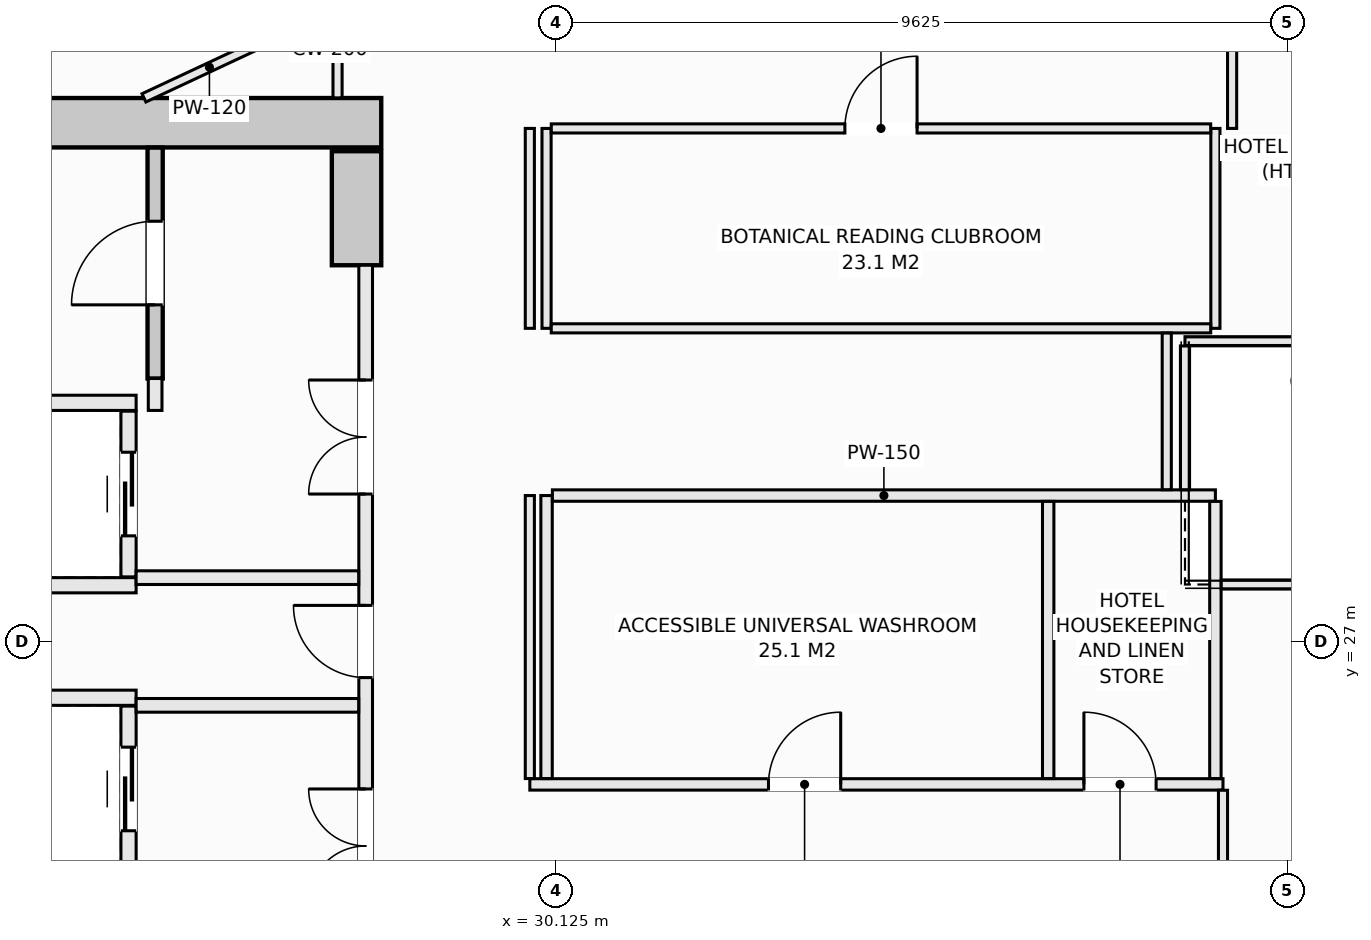
"""IFC4 building model, lengths in metres.
Left out: names, types, materials, properties, quantities, classifications, styles, units other than length and angle.
Written with IfcOpenShell. Run it as: python <this file> out.ifc"""

import sys

from ifc_helpers import new_model, si_unit, direction, frame, frame_2d, origin, place, context, subcontext, project, spatial, rectangle, extrude, element, fill, save


model = new_model("IFC4")
c1 = context("Model", 3, precision=1e-05, world=origin(), true_north=direction((0.0, 1.0)))
c2 = subcontext(c1, "Body", "Model", "MODEL_VIEW")
j1 = project(units=[si_unit("LENGTHUNIT", "METRE"), si_unit("PLANEANGLEUNIT", "RADIAN")], contexts=[c1])
p1 = place(None, origin())
s1 = spatial("IfcSite", under=j1, at=p1, CompositionType="ELEMENT")
p2 = place(p1, origin())
s2 = spatial("IfcBuilding", under=s1, at=p2, CompositionType="ELEMENT")
p3 = place(p2, frame((0.0, 0.0, 118.9)))
s3 = spatial("IfcBuildingStorey", under=s2, at=p3, CompositionType="ELEMENT", Elevation=118.9)
p4 = place(p3, frame((14.175, 33.825, -0.27), z_axis=(0.0, 0.0, 1.0), x_axis=(1.0, 0.0, 0.0)))
e1 = element("IfcWall", 1, at=p4, inside=s3, PredefinedType="SHEAR", context=c2, shape_type="SweptSolid", body=[
    extrude(rectangle(XDim=13.65, YDim=0.65, at=frame_2d((6.825, 0.0))), origin(), (0.0, 0.0, 1.0), 3.4),
])
p5 = place(p3, frame((27.5, 31.95, -0.27), z_axis=(0.0, 0.0, 1.0), x_axis=(0.0, 1.0, 0.0)))
e2 = element("IfcWall", 2, at=p5, inside=s3, PredefinedType="SHEAR", context=c2, shape_type="SweptSolid", body=[
    extrude(rectangle(XDim=1.5, YDim=0.65, at=frame_2d((0.75, 0.0))), origin(), (0.0, 0.0, 1.0), 3.4),
])
p6 = place(p3, frame((24.85, 30.46, -0.27), z_axis=(0.0, 0.0, 1.0), x_axis=(0.0, 1.0, 0.0)))
e3 = element("IfcWall", 3, at=p6, inside=s3, PredefinedType="SHEAR", context=c2, shape_type="SweptSolid", body=[
    extrude(rectangle(XDim=3.038, YDim=0.2, at=frame_2d((1.519, 0.0))), origin(), (0.0, 0.0, 1.0), 3.4),
])
p7 = place(p6, frame((0.969, 0.0, 0.27)))
e4 = element("IfcOpeningElement", 4, at=p7, cuts=e3, PredefinedType="OPENING", context=c2, shape_type="SweptSolid", body=[
    extrude(rectangle(XDim=1.1, YDim=2.15, at=frame_2d((0.55, 1.075))), frame((0.0, 0.11, 0.0), z_axis=(0.0, -1.0, 0.0), x_axis=(1.0, 0.0, 0.0)), (0.0, 0.0, 1.0), 0.22),
])
for number, where, z_axis, x_axis in (
    (5, (22.15, 30.14, 0.0), (0.0, 0.0, 1.0), (1.0, 0.0, 0.0)),
    (6, (22.15, 27.74, 0.0), (0.0, 0.0, 1.0), (1.0, 0.0, 0.0)),
):
    element("IfcWall", number, at=place(p3, frame(where, z_axis=z_axis, x_axis=x_axis)), inside=s3, PredefinedType="SOLIDWALL", context=c2, shape_type="SweptSolid", body=[
        extrude(rectangle(XDim=2.45, YDim=0.2, at=frame_2d((1.225, 0.0))), origin(), (0.0, 0.0, 1.0), 3.13),
    ])
p8 = place(p3, frame((24.5, 27.85, 0.0), z_axis=(0.0, 0.0, 1.0), x_axis=(0.0, 1.0, 0.0)))
e7 = element("IfcWall", 7, at=p8, inside=s3, PredefinedType="SOLIDWALL", context=c2, shape_type="SweptSolid", body=[
    extrude(rectangle(XDim=2.18, YDim=0.2, at=frame_2d((1.09, 0.0))), origin(), (0.0, 0.0, 1.0), 3.13),
])
p9 = place(p8, frame((0.54, 0.0, 0.0)))
e8 = element("IfcOpeningElement", 8, at=p9, cuts=e7, PredefinedType="OPENING", context=c2, shape_type="SweptSolid", body=[
    extrude(rectangle(XDim=1.1, YDim=2.2, at=frame_2d((0.55, 1.1))), frame((0.0, 0.11, 0.0), z_axis=(0.0, -1.0, 0.0), x_axis=(1.0, 0.0, 0.0)), (0.0, 0.0, 1.0), 0.22),
])
p10 = place(p3, frame((22.15, 26.26, 0.0), z_axis=(0.0, 0.0, 1.0), x_axis=(1.0, 0.0, 0.0)))
e9 = element("IfcWall", 9, at=p10, inside=s3, PredefinedType="SOLIDWALL", context=c2, shape_type="SweptSolid", body=[
    extrude(rectangle(XDim=2.45, YDim=0.2, at=frame_2d((1.225, 0.0))), origin(), (0.0, 0.0, 1.0), 3.13),
])
p11 = place(p3, frame((24.5, 23.97, 0.0), z_axis=(0.0, 0.0, 1.0), x_axis=(0.0, 1.0, 0.0)))
e10 = element("IfcWall", 10, at=p11, inside=s3, PredefinedType="SOLIDWALL", context=c2, shape_type="SweptSolid", body=[
    extrude(rectangle(XDim=2.18, YDim=0.2, at=frame_2d((1.09, 0.0))), origin(), (0.0, 0.0, 1.0), 3.13),
])
p12 = place(p11, frame((0.54, 0.0, 0.0)))
e11 = element("IfcOpeningElement", 11, at=p12, cuts=e10, PredefinedType="OPENING", context=c2, shape_type="SweptSolid", body=[
    extrude(rectangle(XDim=1.1, YDim=2.2, at=frame_2d((0.55, 1.1))), frame((0.0, 0.11, 0.0), z_axis=(0.0, -1.0, 0.0), x_axis=(1.0, 0.0, 0.0)), (0.0, 0.0, 1.0), 0.22),
])
p13 = place(p3, frame((24.85, 30.04, 0.0), z_axis=(0.0, 0.0, 1.0), x_axis=(0.0, 1.0, 0.0)))
e12 = element("IfcWall", 12, at=p13, inside=s3, PredefinedType="SOLIDWALL", context=c2, shape_type="SweptSolid", body=[
    extrude(rectangle(XDim=0.42, YDim=0.18, at=frame_2d((0.21, 0.0))), origin(), (0.0, 0.0, 1.0), 3.13),
])
p14 = place(p3, frame((27.62, 22.05, 0.0), z_axis=(0.0, 0.0, 1.0), x_axis=(0.0, 1.0, 0.0)))
e13 = element("IfcWall", 13, at=p14, inside=s3, PredefinedType="SOLIDWALL", context=c2, shape_type="SweptSolid", body=[
    extrude(rectangle(XDim=9.9, YDim=0.18, at=frame_2d((4.95, 0.0))), origin(), (0.0, 0.0, 1.0), 3.13),
])
p15 = place(p14, frame((4.475, 0.0, 0.0)))
e14 = element("IfcOpeningElement", 14, at=p15, cuts=e13, PredefinedType="OPENING", context=c2, shape_type="SweptSolid", body=[
    extrude(rectangle(XDim=0.95, YDim=2.1, at=frame_2d((0.475, 1.05))), frame((0.0, 0.1, 0.0), z_axis=(0.0, -1.0, 0.0), x_axis=(1.0, 0.0, 0.0)), (0.0, 0.0, 1.0), 0.2),
])
p16 = place(p14, frame((6.89, 0.0, 0.0)))
e15 = element("IfcOpeningElement", 15, at=p16, cuts=e13, PredefinedType="OPENING", context=c2, shape_type="SweptSolid", body=[
    extrude(rectangle(XDim=1.5, YDim=2.2, at=frame_2d((0.75, 1.1))), frame((0.0, 0.1, 0.0), z_axis=(0.0, -1.0, 0.0), x_axis=(1.0, 0.0, 0.0)), (0.0, 0.0, 1.0), 0.2),
])
p17 = place(p14, frame((1.51, 0.0, 0.0)))
e16 = element("IfcOpeningElement", 16, at=p17, cuts=e13, PredefinedType="OPENING", context=c2, shape_type="SweptSolid", body=[
    extrude(rectangle(XDim=1.5, YDim=2.2, at=frame_2d((0.75, 1.1))), frame((0.0, 0.1, 0.0), z_axis=(0.0, -1.0, 0.0), x_axis=(1.0, 0.0, 0.0)), (0.0, 0.0, 1.0), 0.2),
])
for number, where, z_axis, x_axis in (
    (17, (24.6, 27.84, 0.0), (0.0, 0.0, 1.0), (1.0, 0.0, 0.0)),
    (18, (24.6, 26.16, 0.0), (0.0, 0.0, 1.0), (1.0, 0.0, 0.0)),
):
    element("IfcWall", number, at=place(p3, frame(where, z_axis=z_axis, x_axis=x_axis)), inside=s3, PredefinedType="SOLIDWALL", context=c2, shape_type="SweptSolid", body=[
        extrude(rectangle(XDim=2.928, YDim=0.18, at=frame_2d((1.464, 0.0))), origin(), (0.0, 0.0, 1.0), 3.13),
    ])
p18 = place(p3, frame((29.78, 25.12, 0.0), z_axis=(0.0, 0.0, 1.0), x_axis=(1.0, 0.0, 0.0)))
e19 = element("IfcWall", 19, at=p18, inside=s3, PredefinedType="PARTITIONING", context=c2, shape_type="SweptSolid", body=[
    extrude(rectangle(XDim=9.12, YDim=0.15, at=frame_2d((4.56, 0.0))), origin(), (0.0, 0.0, 1.0), 3.13),
])
p19 = place(p18, frame((3.14, 0.0, 0.0)))
e20 = element("IfcOpeningElement", 20, at=p19, cuts=e19, PredefinedType="OPENING", context=c2, shape_type="SweptSolid", body=[
    extrude(rectangle(XDim=0.95, YDim=2.1, at=frame_2d((0.475, 1.05))), frame((0.0, 0.085, 0.0), z_axis=(0.0, -1.0, 0.0), x_axis=(1.0, 0.0, 0.0)), (0.0, 0.0, 1.0), 0.17),
])
p20 = place(p18, frame((7.29, 0.0, 0.0)))
e21 = element("IfcOpeningElement", 21, at=p20, cuts=e19, PredefinedType="OPENING", context=c2, shape_type="SweptSolid", body=[
    extrude(rectangle(XDim=0.95, YDim=2.1, at=frame_2d((0.475, 1.05))), frame((0.0, 0.085, 0.0), z_axis=(0.0, -1.0, 0.0), x_axis=(1.0, 0.0, 0.0)), (0.0, 0.0, 1.0), 0.17),
])
p21 = place(p3, frame((30.0, 25.197, 0.0), z_axis=(0.0, 0.0, 1.0), x_axis=(0.0, 1.0, 0.0)))
e22 = element("IfcWall", 22, at=p21, inside=s3, PredefinedType="PARTITIONING", context=c2, shape_type="SweptSolid", body=[
    extrude(rectangle(XDim=3.723, YDim=0.15, at=frame_2d((1.861, 0.0))), origin(), (0.0, 0.0, 1.0), 3.13),
])
p22 = place(p3, frame((30.0, 31.12, 0.0), z_axis=(0.0, 0.0, 1.0), x_axis=(0.0, 1.0, 0.0)))
e23 = element("IfcWall", 23, at=p22, inside=s3, PredefinedType="PARTITIONING", context=c2, shape_type="SweptSolid", body=[
    extrude(rectangle(XDim=2.63, YDim=0.12, at=frame_2d((1.315, 0.0))), origin(), (0.0, 0.0, 1.0), 3.13),
])
p23 = place(p3, frame((30.077, 28.92, 0.0), z_axis=(0.0, 0.0, 1.0), x_axis=(1.0, 0.0, 0.0)))
e24 = element("IfcWall", 24, at=p23, inside=s3, PredefinedType="PARTITIONING", context=c2, shape_type="SweptSolid", body=[
    extrude(rectangle(XDim=8.723, YDim=0.15, at=frame_2d((4.362, 0.0))), origin(), (0.0, 0.0, 1.0), 3.13),
])
for number, where, z_axis, x_axis in (
    (25, (36.6, 25.197, 0.0), (0.0, 0.0, 1.0), (0.0, 1.0, 0.0)),
    (26, (38.8, 25.197, 0.0), (0.0, 0.0, 1.0), (0.0, 1.0, 0.0)),
):
    element("IfcWall", number, at=place(p3, frame(where, z_axis=z_axis, x_axis=x_axis)), inside=s3, PredefinedType="PARTITIONING", context=c2, shape_type="SweptSolid", body=[
        extrude(rectangle(XDim=3.646, YDim=0.15, at=frame_2d((1.823, 0.0))), origin(), (0.0, 0.0, 1.0), 3.13),
    ])
p24 = place(p3, frame((38.8, 31.12, 0.0), z_axis=(0.0, 0.0, 1.0), x_axis=(0.0, 1.0, 0.0)))
e27 = element("IfcWall", 27, at=p24, inside=s3, PredefinedType="PARTITIONING", context=c2, shape_type="SweptSolid", body=[
    extrude(rectangle(XDim=2.63, YDim=0.12, at=frame_2d((1.315, 0.0))), origin(), (0.0, 0.0, 1.0), 3.13),
])
p25 = place(p3, frame((30.062, 31.12, 0.0), z_axis=(0.0, 0.0, 1.0), x_axis=(1.0, 0.0, 0.0)))
e28 = element("IfcWall", 28, at=p25, inside=s3, PredefinedType="PARTITIONING", context=c2, shape_type="SweptSolid", body=[
    extrude(rectangle(XDim=8.676, YDim=0.12, at=frame_2d((4.338, 0.0))), origin(), (0.0, 0.0, 1.0), 3.13),
])
p26 = place(p3, frame((30.062, 33.75, 0.0), z_axis=(0.0, 0.0, 1.0), x_axis=(1.0, 0.0, 0.0)))
e29 = element("IfcWall", 29, at=p26, inside=s3, PredefinedType="PARTITIONING", context=c2, shape_type="SweptSolid", body=[
    extrude(rectangle(XDim=8.676, YDim=0.12, at=frame_2d((4.338, 0.0))), origin(), (0.0, 0.0, 1.0), 3.13),
])
p27 = place(p26, frame((3.863, 0.0, 0.0)))
e30 = element("IfcOpeningElement", 30, at=p27, cuts=e29, PredefinedType="OPENING", context=c2, shape_type="SweptSolid", body=[
    extrude(rectangle(XDim=0.95, YDim=2.1, at=frame_2d((0.475, 1.05))), frame((0.0, 0.07, 0.0), z_axis=(0.0, -1.0, 0.0), x_axis=(1.0, 0.0, 0.0)), (0.0, 0.0, 1.0), 0.14),
])
p28 = place(p3, frame((39.02, 33.75, 0.0), z_axis=(0.0, 0.0, 1.0), x_axis=(0.0, 1.0, 0.0)))
e31 = element("IfcWall", 31, at=p28, inside=s3, PredefinedType="PARTITIONING", context=c2, shape_type="SweptSolid", body=[
    extrude(rectangle(XDim=2.0, YDim=0.12, at=frame_2d((1.0, 0.0))), origin(), (0.0, 0.0, 1.0), 3.13),
])
p29 = place(p3, frame((27.25, 34.152, 0.0), z_axis=(0.0, 0.0, 1.0), x_axis=(0.0, 1.0, 0.0)))
e32 = element("IfcWall", 32, at=p29, inside=s3, PredefinedType="PARTITIONING", context=c2, shape_type="SweptSolid", body=[
    extrude(rectangle(XDim=0.806, YDim=0.12, at=frame_2d((0.403, 0.0))), origin(), (0.0, 0.0, 1.0), 3.13),
])
p30 = place(p3, frame((29.78, 25.197, 0.0), z_axis=(0.0, 0.0, 1.0), x_axis=(0.0, 1.0, 0.0)))
e33 = element("IfcWall", 33, at=p30, inside=s3, PredefinedType="PARTITIONING", context=c2, shape_type="SweptSolid", body=[
    extrude(rectangle(XDim=3.723, YDim=0.12, at=frame_2d((1.861, 0.0))), origin(), (0.0, 0.0, 1.0), 3.13),
])
p31 = place(p3, frame((29.78, 31.12, 0.0), z_axis=(0.0, 0.0, 1.0), x_axis=(0.0, 1.0, 0.0)))
e34 = element("IfcWall", 34, at=p31, inside=s3, PredefinedType="PARTITIONING", context=c2, shape_type="SweptSolid", body=[
    extrude(rectangle(XDim=2.63, YDim=0.12, at=frame_2d((1.315, 0.0))), origin(), (0.0, 0.0, 1.0), 3.13),
])
p32 = place(p3, frame((38.16, 28.997, 0.0), z_axis=(0.0, 0.0, 1.0), x_axis=(0.0, 1.0, 0.0)))
e35 = element("IfcWall", 35, at=p32, inside=s3, PredefinedType="PARTITIONING", context=c2, shape_type="SweptSolid", body=[
    extrude(rectangle(XDim=2.061, YDim=0.12, at=frame_2d((1.031, 0.0))), origin(), (0.0, 0.0, 1.0), 3.13),
])
p33 = place(p3, frame((38.9, 23.02, 0.0), z_axis=(0.0, 0.0, 1.0), x_axis=(0.0, 1.0, 0.0)))
e36 = element("IfcWall", 36, at=p33, inside=s3, PredefinedType="PARTITIONING", context=c2, shape_type="SweptSolid", body=[
    extrude(rectangle(XDim=2.023, YDim=0.12, at=frame_2d((1.011, 0.0))), origin(), (0.0, 0.0, 1.0), 3.13),
])
p34 = place(p3, frame((24.703, 34.152, 0.0), z_axis=(0.0, 0.0, 1.0), x_axis=(0.90580239241, 0.423700396393, 0.0)))
e37 = element("IfcWall", 37, at=p34, inside=s3, PredefinedType="PARTITIONING", context=c2, shape_type="SweptSolid", body=[
    extrude(rectangle(XDim=1.902, YDim=0.12, at=frame_2d((0.951, 0.0))), origin(), (0.0, 0.0, 1.0), 3.13),
])
p35 = place(p3, frame((38.877, 27.75, 0.0), z_axis=(0.0, 0.0, 1.0), x_axis=(1.0, 0.0, 0.0)))
e38 = element("IfcWall", 38, at=p35, inside=s3, PredefinedType="PARTITIONING", context=c2, shape_type="SweptSolid", body=[
    extrude(rectangle(XDim=4.923, YDim=0.12, at=frame_2d((2.461, 0.0))), origin(), (0.0, 0.0, 1.0), 3.13),
])
p36 = place(p3, frame((36.468, 40.488, 0.0), z_axis=(0.0, 0.0, 1.0), x_axis=(0.607033615812, -0.794676153709, 0.0)))
e39 = element("IfcWall", 39, at=p36, inside=s3, PredefinedType="PARTITIONING", context=c2, shape_type="SweptSolid", body=[
    extrude(rectangle(XDim=12.078, YDim=0.15, at=frame_2d((6.039, 0.0))), origin(), (0.0, 0.0, 1.0), 3.13),
])
p37 = place(p3, frame((38.4, 30.95, 0.0), z_axis=(0.0, 0.0, 1.0), x_axis=(1.0, 0.0, 0.0)))
e40 = element("IfcWall", 40, at=p37, inside=s3, PredefinedType="PARTITIONING", context=c2, shape_type="SweptSolid", body=[
    extrude(rectangle(XDim=5.257, YDim=0.12, at=frame_2d((2.629, 0.0))), origin(), (0.0, 0.0, 1.0), 3.13),
])
p38 = place(p3, frame((38.4, 28.997, 0.0), z_axis=(0.0, 0.0, 1.0), x_axis=(0.0, 1.0, 0.0)))
e41 = element("IfcWall", 41, at=p38, inside=s3, PredefinedType="PARTITIONING", context=c2, shape_type="SweptSolid", body=[
    extrude(rectangle(XDim=1.891, YDim=0.12, at=frame_2d((0.945, 0.0))), origin(), (0.0, 0.0, 1.0), 3.13),
])
p39 = place(p7, origin())
e42 = element("IfcDoor", 42, at=p39, inside=s3, OperationType="SINGLE_SWING_LEFT", PredefinedType="DOOR", context=c2, shape_type="SweptSolid", body=[
    extrude(rectangle(XDim=1.1, YDim=2.15, at=frame_2d((0.55, 1.075))), frame((0.0, 0.025, 0.0), z_axis=(0.0, -1.0, 0.0), x_axis=(1.0, 0.0, 0.0)), (0.0, 0.0, 1.0), 0.05),
])
fill(e4, e42)
p40 = place(p9, origin())
e43 = element("IfcDoor", 43, at=p40, inside=s3, OperationType="SLIDING_TO_LEFT", PredefinedType="DOOR", context=c2, shape_type="SweptSolid", body=[
    extrude(rectangle(XDim=1.1, YDim=2.2, at=frame_2d((0.55, 1.1))), frame((0.0, 0.025, 0.0), z_axis=(0.0, -1.0, 0.0), x_axis=(1.0, 0.0, 0.0)), (0.0, 0.0, 1.0), 0.05),
])
fill(e8, e43)
p41 = place(p12, origin())
e44 = element("IfcDoor", 44, at=p41, inside=s3, OperationType="SLIDING_TO_LEFT", PredefinedType="DOOR", context=c2, shape_type="SweptSolid", body=[
    extrude(rectangle(XDim=1.1, YDim=2.2, at=frame_2d((0.55, 1.1))), frame((0.0, 0.025, 0.0), z_axis=(0.0, -1.0, 0.0), x_axis=(1.0, 0.0, 0.0)), (0.0, 0.0, 1.0), 0.05),
])
fill(e11, e44)
p42 = place(p15, origin())
e45 = element("IfcDoor", 45, at=p42, inside=s3, OperationType="SINGLE_SWING_RIGHT", PredefinedType="DOOR", context=c2, shape_type="SweptSolid", body=[
    extrude(rectangle(XDim=0.95, YDim=2.1, at=frame_2d((0.475, 1.05))), frame((0.0, 0.025, 0.0), z_axis=(0.0, -1.0, 0.0), x_axis=(1.0, 0.0, 0.0)), (0.0, 0.0, 1.0), 0.05),
])
fill(e14, e45)
p43 = place(p16, origin())
e46 = element("IfcDoor", 46, at=p43, inside=s3, OperationType="DOUBLE_DOOR_SINGLE_SWING", PredefinedType="DOOR", context=c2, shape_type="SweptSolid", body=[
    extrude(rectangle(XDim=1.5, YDim=2.2, at=frame_2d((0.75, 1.1))), frame((0.0, 0.025, 0.0), z_axis=(0.0, -1.0, 0.0), x_axis=(1.0, 0.0, 0.0)), (0.0, 0.0, 1.0), 0.05),
])
fill(e15, e46)
p44 = place(p17, origin())
e47 = element("IfcDoor", 47, at=p44, inside=s3, OperationType="DOUBLE_DOOR_SINGLE_SWING", PredefinedType="DOOR", context=c2, shape_type="SweptSolid", body=[
    extrude(rectangle(XDim=1.5, YDim=2.2, at=frame_2d((0.75, 1.1))), frame((0.0, 0.025, 0.0), z_axis=(0.0, -1.0, 0.0), x_axis=(1.0, 0.0, 0.0)), (0.0, 0.0, 1.0), 0.05),
])
fill(e16, e47)
p45 = place(p19, origin())
e48 = element("IfcDoor", 48, at=p45, inside=s3, OperationType="SINGLE_SWING_RIGHT", PredefinedType="DOOR", context=c2, shape_type="SweptSolid", body=[
    extrude(rectangle(XDim=0.95, YDim=2.1, at=frame_2d((0.475, 1.05))), frame((0.0, 0.025, 0.0), z_axis=(0.0, -1.0, 0.0), x_axis=(1.0, 0.0, 0.0)), (0.0, 0.0, 1.0), 0.05),
])
fill(e20, e48)
p46 = place(p20, origin())
e49 = element("IfcDoor", 49, at=p46, inside=s3, OperationType="SINGLE_SWING_LEFT", PredefinedType="DOOR", context=c2, shape_type="SweptSolid", body=[
    extrude(rectangle(XDim=0.95, YDim=2.1, at=frame_2d((0.475, 1.05))), frame((0.0, 0.025, 0.0), z_axis=(0.0, -1.0, 0.0), x_axis=(1.0, 0.0, 0.0)), (0.0, 0.0, 1.0), 0.05),
])
fill(e21, e49)
p47 = place(p27, origin())
e50 = element("IfcDoor", 50, at=p47, inside=s3, OperationType="SINGLE_SWING_RIGHT", PredefinedType="DOOR", context=c2, shape_type="SweptSolid", body=[
    extrude(rectangle(XDim=0.95, YDim=2.1, at=frame_2d((0.475, 1.05))), frame((0.0, 0.025, 0.0), z_axis=(0.0, -1.0, 0.0), x_axis=(1.0, 0.0, 0.0)), (0.0, 0.0, 1.0), 0.05),
])
fill(e30, e50)
save(model, sys.argv[1])
